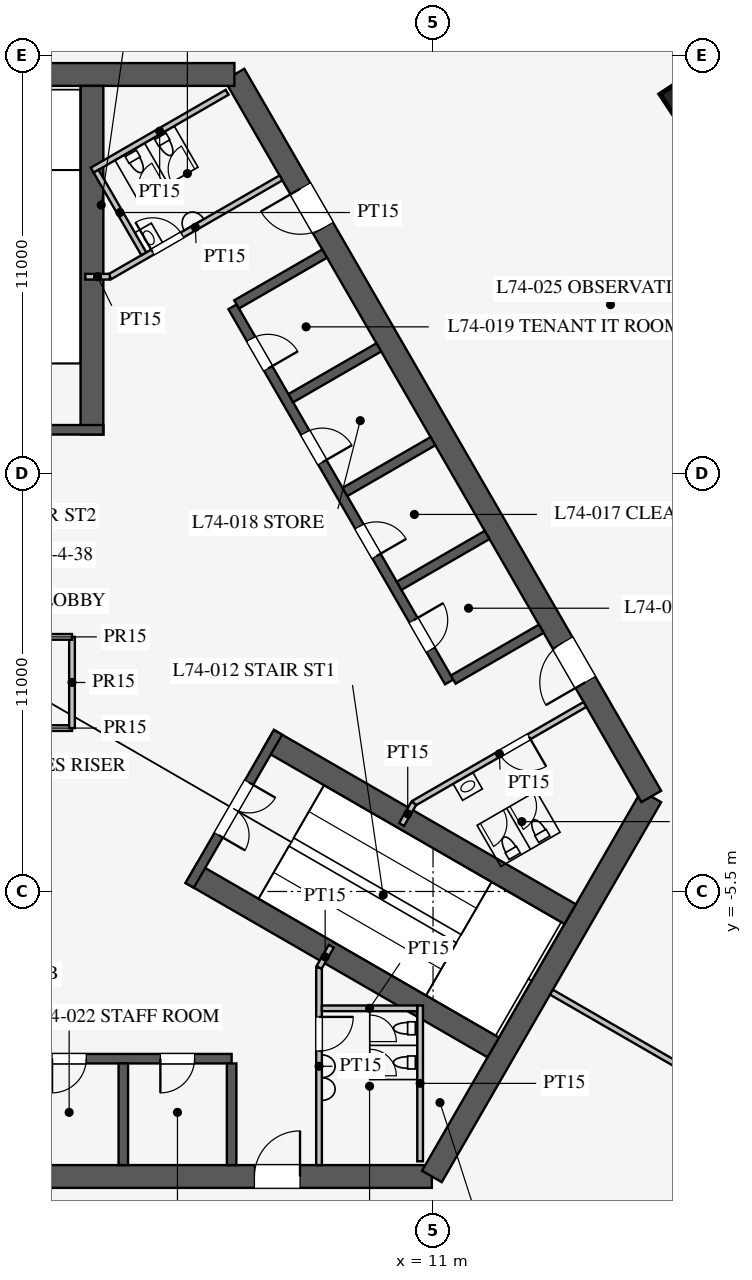
"""IFC4 building model, lengths in metres.
Left out: names, types, materials, properties, quantities, classifications, styles, units other than length and angle.
Written with IfcOpenShell. Run it as: python <this file> out.ifc"""

import sys

from ifc_helpers import new_model, si_unit, direction, frame, frame_2d, origin, origin_2d, place, context, subcontext, project, spatial, rectangle, extrude, element, fill, save


model = new_model("IFC4")
c1 = context("Model", 3, precision=1e-05, world=origin(), true_north=direction((0.0, 1.0)))
c2 = subcontext(c1, "Body", "Model", "MODEL_VIEW")
j1 = project(units=[si_unit("LENGTHUNIT", "METRE"), si_unit("PLANEANGLEUNIT", "RADIAN")], contexts=[c1])
p1 = place(None, origin())
s1 = spatial("IfcSite", under=j1, at=p1, CompositionType="ELEMENT")
p2 = place(p1, origin())
s2 = spatial("IfcBuilding", under=s1, at=p2, CompositionType="ELEMENT")
p3 = place(p2, frame((0.0, 0.0, 322.5)))
s3 = spatial("IfcBuildingStorey", under=s2, at=p3, CompositionType="ELEMENT", Elevation=322.5)
p4 = place(p3, frame((17.594, 15.354, 0.0), z_axis=(0.0, 0.0, 1.0), x_axis=(-0.551523797289, 0.834159158089, 0.0)))
e1 = element("IfcColumn", 1, at=p4, inside=s3, PredefinedType="COLUMN", context=c2, shape_type="SweptSolid", body=[
    extrude(rectangle(XDim=0.9, YDim=0.9, at=origin_2d()), origin(), (0.0, 0.0, 1.0), 6.0),
])
p5 = place(p3, frame((-10.97, -13.0, 0.0), z_axis=(0.0, 0.0, 1.0), x_axis=(1.0, 0.0, 0.0)))
e2 = element("IfcWall", 2, at=p5, inside=s3, PredefinedType="SHEAR", context=c2, shape_type="SweptSolid", body=[
    extrude(rectangle(XDim=21.939, YDim=0.6, at=frame_2d((10.97, 0.0))), origin(), (0.0, 0.0, 1.0), 6.0),
])
p6 = place(p5, frame((17.27, 0.0, 0.0)))
e3 = element("IfcOpeningElement", 3, at=p6, cuts=e2, PredefinedType="OPENING", context=c2, shape_type="SweptSolid", body=[
    extrude(rectangle(XDim=1.2, YDim=2.1, at=frame_2d((0.6, 1.05))), frame((0.0, 0.31, 0.0), z_axis=(0.0, -1.0, 0.0), x_axis=(1.0, 0.0, 0.0)), (0.0, 0.0, 1.0), 0.62),
])
p7 = place(p5, frame((3.47, 0.0, 0.0)))
e4 = element("IfcOpeningElement", 4, at=p7, cuts=e2, PredefinedType="OPENING", context=c2, shape_type="SweptSolid", body=[
    extrude(rectangle(XDim=1.2, YDim=2.1, at=frame_2d((0.6, 1.05))), frame((0.0, 0.31, 0.0), z_axis=(0.0, -1.0, 0.0), x_axis=(1.0, 0.0, 0.0)), (0.0, 0.0, 1.0), 0.62),
])
p8 = place(p3, frame((10.97, -13.0, 0.0), z_axis=(0.0, 0.0, 1.0), x_axis=(0.499995765644, 0.866027848477, 0.0)))
e5 = element("IfcWall", 5, at=p8, inside=s3, PredefinedType="SHEAR", context=c2, shape_type="SweptSolid", body=[
    extrude(rectangle(XDim=11.547, YDim=0.6, at=frame_2d((5.773, 0.0))), origin(), (0.0, 0.0, 1.0), 6.0),
])
p9 = place(p3, frame((16.743, -3.0, 0.0), z_axis=(0.0, 0.0, 1.0), x_axis=(-0.500002442456, 0.866023993627, 0.0)))
e6 = element("IfcWall", 6, at=p9, inside=s3, PredefinedType="SHEAR", context=c2, shape_type="SweptSolid", body=[
    extrude(rectangle(XDim=21.939, YDim=0.6, at=frame_2d((10.97, 0.0))), origin(), (0.0, 0.0, 1.0), 6.0),
])
p10 = place(p9, frame((17.27, 0.0, 0.0)))
e7 = element("IfcOpeningElement", 7, at=p10, cuts=e6, PredefinedType="OPENING", context=c2, shape_type="SweptSolid", body=[
    extrude(rectangle(XDim=1.2, YDim=2.1, at=frame_2d((0.6, 1.05))), frame((0.0, 0.31, 0.0), z_axis=(0.0, -1.0, 0.0), x_axis=(1.0, 0.0, 0.0)), (0.0, 0.0, 1.0), 0.62),
])
p11 = place(p9, frame((3.47, 0.0, 0.0)))
e8 = element("IfcOpeningElement", 8, at=p11, cuts=e6, PredefinedType="OPENING", context=c2, shape_type="SweptSolid", body=[
    extrude(rectangle(XDim=1.2, YDim=2.1, at=frame_2d((0.6, 1.05))), frame((0.0, 0.31, 0.0), z_axis=(0.0, -1.0, 0.0), x_axis=(1.0, 0.0, 0.0)), (0.0, 0.0, 1.0), 0.62),
])
p12 = place(p3, frame((5.773, 16.0, 0.0), z_axis=(0.0, 0.0, 1.0), x_axis=(-1.0, 0.0, 0.0)))
e9 = element("IfcWall", 9, at=p12, inside=s3, PredefinedType="SHEAR", context=c2, shape_type="SweptSolid", body=[
    extrude(rectangle(XDim=11.547, YDim=0.6, at=frame_2d((5.773, 0.0))), origin(), (0.0, 0.0, 1.0), 6.0),
])
p13 = place(p3, frame((-5.7, -9.9, 0.0), z_axis=(0.0, 0.0, 1.0), x_axis=(1.0, 0.0, 0.0)))
e10 = element("IfcWall", 10, at=p13, inside=s3, PredefinedType="SHEAR", context=c2, shape_type="SweptSolid", body=[
    extrude(rectangle(XDim=11.4, YDim=0.25, at=frame_2d((5.7, 0.0))), origin(), (0.0, 0.0, 1.0), 6.0),
])
p14 = place(p13, frame((0.975, 0.0, 0.0)))
e11 = element("IfcOpeningElement", 11, at=p14, cuts=e10, PredefinedType="OPENING", context=c2, shape_type="SweptSolid", body=[
    extrude(rectangle(XDim=0.9, YDim=2.1, at=frame_2d((0.45, 1.05))), frame((0.0, 0.135, 0.0), z_axis=(0.0, -1.0, 0.0), x_axis=(1.0, 0.0, 0.0)), (0.0, 0.0, 1.0), 0.27),
])
p15 = place(p13, frame((3.825, 0.0, 0.0)))
e12 = element("IfcOpeningElement", 12, at=p15, cuts=e10, PredefinedType="OPENING", context=c2, shape_type="SweptSolid", body=[
    extrude(rectangle(XDim=0.9, YDim=2.1, at=frame_2d((0.45, 1.05))), frame((0.0, 0.135, 0.0), z_axis=(0.0, -1.0, 0.0), x_axis=(1.0, 0.0, 0.0)), (0.0, 0.0, 1.0), 0.27),
])
p16 = place(p13, frame((6.675, 0.0, 0.0)))
e13 = element("IfcOpeningElement", 13, at=p16, cuts=e10, PredefinedType="OPENING", context=c2, shape_type="SweptSolid", body=[
    extrude(rectangle(XDim=0.9, YDim=2.1, at=frame_2d((0.45, 1.05))), frame((0.0, 0.135, 0.0), z_axis=(0.0, -1.0, 0.0), x_axis=(1.0, 0.0, 0.0)), (0.0, 0.0, 1.0), 0.27),
])
p17 = place(p13, frame((9.525, 0.0, 0.0)))
e14 = element("IfcOpeningElement", 14, at=p17, cuts=e10, PredefinedType="OPENING", context=c2, shape_type="SweptSolid", body=[
    extrude(rectangle(XDim=0.9, YDim=2.1, at=frame_2d((0.45, 1.05))), frame((0.0, 0.135, 0.0), z_axis=(0.0, -1.0, 0.0), x_axis=(1.0, 0.0, 0.0)), (0.0, 0.0, 1.0), 0.27),
])
for number, where, z_axis, x_axis in (
    (15, (2.85, -10.025, 0.0), (0.0, 0.0, 1.0), (0.0, -1.0, 0.0)),
    (16, (5.7, -10.025, 0.0), (0.0, 0.0, 1.0), (0.0, -1.0, 0.0)),
):
    element("IfcWall", number, at=place(p3, frame(where, z_axis=z_axis, x_axis=x_axis)), inside=s3, PredefinedType="SHEAR", context=c2, shape_type="SweptSolid", body=[
        extrude(rectangle(XDim=2.675, YDim=0.25, at=frame_2d((1.337, 0.0))), origin(), (0.0, 0.0, 1.0), 6.0),
    ])
p18 = place(p3, frame((11.424, 0.014, 0.0), z_axis=(0.0, 0.0, 1.0), x_axis=(-0.500001763848, 0.866024385424, 0.0)))
e17 = element("IfcWall", 17, at=p18, inside=s3, PredefinedType="SHEAR", context=c2, shape_type="SweptSolid", body=[
    extrude(rectangle(XDim=11.4, YDim=0.25, at=frame_2d((5.7, 0.0))), origin(), (0.0, 0.0, 1.0), 6.0),
])
p19 = place(p18, frame((0.975, 0.0, 0.0)))
e18 = element("IfcOpeningElement", 18, at=p19, cuts=e17, PredefinedType="OPENING", context=c2, shape_type="SweptSolid", body=[
    extrude(rectangle(XDim=0.9, YDim=2.1, at=frame_2d((0.45, 1.05))), frame((0.0, 0.135, 0.0), z_axis=(0.0, -1.0, 0.0), x_axis=(1.0, 0.0, 0.0)), (0.0, 0.0, 1.0), 0.27),
])
p20 = place(p18, frame((3.825, 0.0, 0.0)))
e19 = element("IfcOpeningElement", 19, at=p20, cuts=e17, PredefinedType="OPENING", context=c2, shape_type="SweptSolid", body=[
    extrude(rectangle(XDim=0.9, YDim=2.1, at=frame_2d((0.45, 1.05))), frame((0.0, 0.135, 0.0), z_axis=(0.0, -1.0, 0.0), x_axis=(1.0, 0.0, 0.0)), (0.0, 0.0, 1.0), 0.27),
])
p21 = place(p18, frame((6.675, 0.0, 0.0)))
e20 = element("IfcOpeningElement", 20, at=p21, cuts=e17, PredefinedType="OPENING", context=c2, shape_type="SweptSolid", body=[
    extrude(rectangle(XDim=0.9, YDim=2.1, at=frame_2d((0.45, 1.05))), frame((0.0, 0.135, 0.0), z_axis=(0.0, -1.0, 0.0), x_axis=(1.0, 0.0, 0.0)), (0.0, 0.0, 1.0), 0.27),
])
p22 = place(p18, frame((9.525, 0.0, 0.0)))
e21 = element("IfcOpeningElement", 21, at=p22, cuts=e17, PredefinedType="OPENING", context=c2, shape_type="SweptSolid", body=[
    extrude(rectangle(XDim=0.9, YDim=2.1, at=frame_2d((0.45, 1.05))), frame((0.0, 0.135, 0.0), z_axis=(0.0, -1.0, 0.0), x_axis=(1.0, 0.0, 0.0)), (0.0, 0.0, 1.0), 0.27),
])
for number, where, z_axis, x_axis in (
    (22, (11.532, 0.076, 0.0), (0.0, 0.0, 1.0), (0.866, 0.5, 0.0)),
    (23, (10.107, 2.544, 0.0), (0.0, 0.0, 1.0), (0.866, 0.5, 0.0)),
    (24, (8.682, 5.012, 0.0), (0.0, 0.0, 1.0), (0.866, 0.5, 0.0)),
    (25, (7.257, 7.481, 0.0), (0.0, 0.0, 1.0), (0.866, 0.5, 0.0)),
    (26, (5.832, 9.949, 0.0), (0.0, 0.0, 1.0), (0.866, 0.5, 0.0)),
):
    element("IfcWall", number, at=place(p3, frame(where, z_axis=z_axis, x_axis=x_axis)), inside=s3, PredefinedType="SHEAR", context=c2, shape_type="SweptSolid", body=[
        extrude(rectangle(XDim=2.675, YDim=0.25, at=frame_2d((1.337, 0.0))), origin(), (0.0, 0.0, 1.0), 6.0),
    ])
p23 = place(p3, frame((4.638, -5.016, 0.0), z_axis=(0.0, 0.0, 1.0), x_axis=(0.866012320003, -0.50002266109, 0.0)))
e27 = element("IfcWall", 27, at=p23, inside=s3, PredefinedType="SHEAR", context=c2, shape_type="SweptSolid", body=[
    extrude(rectangle(XDim=9.175, YDim=0.6, at=frame_2d((4.587, 0.0))), origin(), (0.0, 0.0, 1.0), 6.0),
])
p24 = place(p3, frame((6.663, -1.509, 0.0), z_axis=(0.0, 0.0, 1.0), x_axis=(0.86603049496, -0.499991181721, 0.0)))
e28 = element("IfcWall", 28, at=p24, inside=s3, PredefinedType="SHEAR", context=c2, shape_type="SweptSolid", body=[
    extrude(rectangle(XDim=9.175, YDim=0.6, at=frame_2d((4.587, 0.0))), origin(), (0.0, 0.0, 1.0), 6.0),
])
p25 = place(p3, frame((4.597, -5.339, 0.0), z_axis=(0.0, 0.0, 1.0), x_axis=(0.499984536904, 0.866034331223, 0.0)))
e29 = element("IfcWall", 29, at=p25, inside=s3, PredefinedType="SHEAR", context=c2, shape_type="SweptSolid", body=[
    extrude(rectangle(XDim=4.65, YDim=0.25, at=frame_2d((2.325, 0.0))), origin(), (0.0, 0.0, 1.0), 6.0),
])
p26 = place(p25, frame((1.525, 0.0, 0.0)))
e30 = element("IfcOpeningElement", 30, at=p26, cuts=e29, PredefinedType="OPENING", context=c2, shape_type="SweptSolid", body=[
    extrude(rectangle(XDim=1.6, YDim=2.1, at=frame_2d((0.8, 1.05))), frame((0.0, 0.135, 0.0), z_axis=(0.0, -1.0, 0.0), x_axis=(1.0, 0.0, 0.0)), (0.0, 0.0, 1.0), 0.27),
])
p27 = place(p3, frame((2.025, 6.525, 0.0), z_axis=(0.0, 0.0, 1.0), x_axis=(0.0, 1.0, 0.0)))
e31 = element("IfcWall", 31, at=p27, inside=s3, PredefinedType="SHEAR", context=c2, shape_type="SweptSolid", body=[
    extrude(rectangle(XDim=9.175, YDim=0.6, at=frame_2d((4.587, 0.0))), origin(), (0.0, 0.0, 1.0), 6.0),
])
p28 = place(p3, frame((2.325, 6.65, 0.0), z_axis=(0.0, 0.0, 1.0), x_axis=(-1.0, 0.0, 0.0)))
e32 = element("IfcWall", 32, at=p28, inside=s3, PredefinedType="SHEAR", context=c2, shape_type="SweptSolid", body=[
    extrude(rectangle(XDim=4.65, YDim=0.25, at=frame_2d((2.325, 0.0))), origin(), (0.0, 0.0, 1.0), 6.0),
])
p29 = place(p28, frame((1.525, 0.0, 0.0)))
e33 = element("IfcOpeningElement", 33, at=p29, cuts=e32, PredefinedType="OPENING", context=c2, shape_type="SweptSolid", body=[
    extrude(rectangle(XDim=1.6, YDim=2.1, at=frame_2d((0.8, 1.05))), frame((0.0, 0.135, 0.0), z_axis=(0.0, -1.0, 0.0), x_axis=(1.0, 0.0, 0.0)), (0.0, 0.0, 1.0), 0.27),
])
p30 = place(p3, frame((8.0, -7.5, 0.0), z_axis=(0.0, 0.0, 1.0), x_axis=(0.0, -1.0, 0.0)))
e34 = element("IfcWall", 34, at=p30, inside=s3, PredefinedType="PARTITIONING", context=c2, shape_type="SweptSolid", body=[
    extrude(rectangle(XDim=5.2, YDim=0.15, at=frame_2d((2.6, 0.0))), origin(), (0.0, 0.0, 1.0), 5.75),
])
p31 = place(p30, frame((1.3, 0.0, 0.0)))
e35 = element("IfcOpeningElement", 35, at=p31, cuts=e34, PredefinedType="OPENING", context=c2, shape_type="SweptSolid", body=[
    extrude(rectangle(XDim=0.9, YDim=2.1, at=frame_2d((0.45, 1.05))), frame((0.0, 0.085, 0.0), z_axis=(0.0, -1.0, 0.0), x_axis=(1.0, 0.0, 0.0)), (0.0, 0.0, 1.0), 0.17),
])
p32 = place(p3, frame((2.495, 10.678, 0.0), z_axis=(0.0, 0.0, 1.0), x_axis=(0.866021400173, 0.500006934395, 0.0)))
e36 = element("IfcWall", 36, at=p32, inside=s3, PredefinedType="PARTITIONING", context=c2, shape_type="SweptSolid", body=[
    extrude(rectangle(XDim=5.2, YDim=0.15, at=frame_2d((2.6, 0.0))), origin(), (0.0, 0.0, 1.0), 5.75),
])
p33 = place(p32, frame((1.3, 0.0, 0.0)))
e37 = element("IfcOpeningElement", 37, at=p33, cuts=e36, PredefinedType="OPENING", context=c2, shape_type="SweptSolid", body=[
    extrude(rectangle(XDim=0.9, YDim=2.1, at=frame_2d((0.45, 1.05))), frame((0.0, 0.085, 0.0), z_axis=(0.0, -1.0, 0.0), x_axis=(1.0, 0.0, 0.0)), (0.0, 0.0, 1.0), 0.17),
])
p34 = place(p3, frame((10.495, -3.178, 0.0), z_axis=(0.0, 0.0, 1.0), x_axis=(0.866021400173, 0.500006934395, 0.0)))
e38 = element("IfcWall", 38, at=p34, inside=s3, PredefinedType="PARTITIONING", context=c2, shape_type="SweptSolid", body=[
    extrude(rectangle(XDim=5.2, YDim=0.15, at=frame_2d((2.6, 0.0))), origin(), (0.0, 0.0, 1.0), 5.75),
])
p35 = place(p34, frame((2.6, 0.0, 0.0)))
e39 = element("IfcOpeningElement", 39, at=p35, cuts=e38, PredefinedType="OPENING", context=c2, shape_type="SweptSolid", body=[
    extrude(rectangle(XDim=0.9, YDim=2.1, at=frame_2d((0.45, 1.05))), frame((0.0, 0.085, 0.0), z_axis=(0.0, -1.0, 0.0), x_axis=(1.0, 0.0, 0.0)), (0.0, 0.0, 1.0), 0.17),
])
for number, where, z_axis, x_axis in (
    (40, (8.0, -7.5, 0.0), (0.0, 0.0, 1.0), (0.5, 0.866, 0.0)),
    (41, (10.495, -3.178, 0.0), (0.0, 0.0, 1.0), (-0.5, -0.866, 0.0)),
):
    element("IfcWall", number, at=place(p3, frame(where, z_axis=z_axis, x_axis=x_axis)), inside=s3, PredefinedType="PARTITIONING", context=c2, shape_type="SweptSolid", body=[
        extrude(rectangle(XDim=0.645, YDim=0.15, at=frame_2d((0.323, 0.0))), origin(), (0.0, 0.0, 1.0), 5.75),
    ])
p36 = place(p3, frame((2.495, 10.678, 0.0), z_axis=(0.0, 0.0, 1.0), x_axis=(-1.0, 0.0, 0.0)))
e42 = element("IfcWall", 42, at=p36, inside=s3, PredefinedType="PARTITIONING", context=c2, shape_type="SweptSolid", body=[
    extrude(rectangle(XDim=0.645, YDim=0.15, at=frame_2d((0.323, 0.0))), origin(), (0.0, 0.0, 1.0), 5.75),
])
p37 = place(p3, frame((10.66, -8.5, 0.0), z_axis=(0.0, 0.0, 1.0), x_axis=(0.0, -1.0, 0.0)))
e43 = element("IfcWall", 43, at=p37, inside=s3, PredefinedType="PARTITIONING", context=c2, shape_type="SweptSolid", body=[
    extrude(rectangle(XDim=4.1, YDim=0.15, at=frame_2d((2.05, 0.0))), origin(), (0.0, 0.0, 1.0), 5.75),
])
p38 = place(p3, frame((8.075, -8.575, 0.0), z_axis=(0.0, 0.0, 1.0), x_axis=(1.0, 0.0, 0.0)))
e44 = element("IfcWall", 44, at=p38, inside=s3, PredefinedType="PARTITIONING", context=c2, shape_type="SweptSolid", body=[
    extrude(rectangle(XDim=2.51, YDim=0.15, at=frame_2d((1.255, 0.0))), origin(), (0.0, 0.0, 1.0), 5.75),
])
p39 = place(p3, frame((2.031, 13.482, 0.0), z_axis=(0.0, 0.0, 1.0), x_axis=(0.866050731258, 0.499956128963, 0.0)))
e45 = element("IfcWall", 45, at=p39, inside=s3, PredefinedType="PARTITIONING", context=c2, shape_type="SweptSolid", body=[
    extrude(rectangle(XDim=4.1, YDim=0.15, at=frame_2d((2.05, 0.0))), origin(), (0.0, 0.0, 1.0), 5.75),
])
p40 = place(p3, frame((3.389, 11.281, 0.0), z_axis=(0.0, 0.0, 1.0), x_axis=(-0.499989096993, 0.866031698547, 0.0)))
e46 = element("IfcWall", 46, at=p40, inside=s3, PredefinedType="PARTITIONING", context=c2, shape_type="SweptSolid", body=[
    extrude(rectangle(XDim=2.51, YDim=0.15, at=frame_2d((1.255, 0.0))), origin(), (0.0, 0.0, 1.0), 5.75),
])
p41 = place(p3, frame((-1.5, -1.2, 0.0), z_axis=(0.0, 0.0, 1.0), x_axis=(1.0, 0.0, 0.0)))
e47 = element("IfcWall", 47, at=p41, inside=s3, PredefinedType="PARTITIONING", context=c2, shape_type="SweptSolid", body=[
    extrude(rectangle(XDim=3.0, YDim=0.15, at=frame_2d((1.5, 0.0))), origin(), (0.0, 0.0, 1.0), 5.75),
])
p42 = place(p41, frame((1.05, 0.0, 0.0)))
e48 = element("IfcOpeningElement", 48, at=p42, cuts=e47, PredefinedType="OPENING", context=c2, shape_type="SweptSolid", body=[
    extrude(rectangle(XDim=0.9, YDim=2.1, at=frame_2d((0.45, 1.05))), frame((0.0, 0.085, 0.0), z_axis=(0.0, -1.0, 0.0), x_axis=(1.0, 0.0, 0.0)), (0.0, 0.0, 1.0), 0.17),
])
p43 = place(p3, frame((1.5, -1.2, 0.0), z_axis=(0.0, 0.0, 1.0), x_axis=(0.0, 1.0, 0.0)))
e49 = element("IfcWall", 49, at=p43, inside=s3, PredefinedType="PARTITIONING", context=c2, shape_type="SweptSolid", body=[
    extrude(rectangle(XDim=2.4, YDim=0.15, at=frame_2d((1.2, 0.0))), origin(), (0.0, 0.0, 1.0), 5.75),
])
p44 = place(p3, frame((1.5, 1.2, 0.0), z_axis=(0.0, 0.0, 1.0), x_axis=(-1.0, 0.0, 0.0)))
e50 = element("IfcWall", 50, at=p44, inside=s3, PredefinedType="PARTITIONING", context=c2, shape_type="SweptSolid", body=[
    extrude(rectangle(XDim=3.0, YDim=0.15, at=frame_2d((1.5, 0.0))), origin(), (0.0, 0.0, 1.0), 5.75),
])
p45 = place(p3, frame((14.116, -8.15, 0.0), z_axis=(0.0, 0.0, 1.0), x_axis=(0.866020541135, -0.500008422262, 0.0)))
e51 = element("IfcWall", 51, at=p45, inside=s3, PredefinedType="PARTITIONING", context=c2, shape_type="SweptSolid", body=[
    extrude(rectangle(XDim=13.45, YDim=0.15, at=frame_2d((6.725, 0.0))), origin(), (0.0, 0.0, 1.0), 3.75),
])
p46 = place(p31, origin())
e52 = element("IfcDoor", 52, at=p46, inside=s3, OperationType="SINGLE_SWING_LEFT", PredefinedType="DOOR", context=c2, shape_type="SweptSolid", body=[
    extrude(rectangle(XDim=0.9, YDim=2.1, at=frame_2d((0.45, 1.05))), frame((0.0, 0.025, 0.0), z_axis=(0.0, -1.0, 0.0), x_axis=(1.0, 0.0, 0.0)), (0.0, 0.0, 1.0), 0.05),
])
fill(e35, e52)
p47 = place(p33, origin())
e53 = element("IfcDoor", 53, at=p47, inside=s3, OperationType="SINGLE_SWING_LEFT", PredefinedType="DOOR", context=c2, shape_type="SweptSolid", body=[
    extrude(rectangle(XDim=0.9, YDim=2.1, at=frame_2d((0.45, 1.05))), frame((0.0, 0.025, 0.0), z_axis=(0.0, -1.0, 0.0), x_axis=(1.0, 0.0, 0.0)), (0.0, 0.0, 1.0), 0.05),
])
fill(e37, e53)
p48 = place(p35, frame((0.9, 0.0, 0.0), z_axis=(0.0, 0.0, 1.0), x_axis=(-1.0, 0.0, 0.0)))
e54 = element("IfcDoor", 54, at=p48, inside=s3, OperationType="SINGLE_SWING_LEFT", PredefinedType="DOOR", context=c2, shape_type="SweptSolid", body=[
    extrude(rectangle(XDim=0.9, YDim=2.1, at=frame_2d((0.45, 1.05))), frame((0.0, 0.025, 0.0), z_axis=(0.0, -1.0, 0.0), x_axis=(1.0, 0.0, 0.0)), (0.0, 0.0, 1.0), 0.05),
])
fill(e39, e54)
p49 = place(p26, frame((1.6, 0.0, 0.0), z_axis=(0.0, 0.0, 1.0), x_axis=(-1.0, 0.0, 0.0)))
e55 = element("IfcDoor", 55, at=p49, inside=s3, OperationType="DOUBLE_DOOR_SINGLE_SWING", PredefinedType="DOOR", context=c2, shape_type="SweptSolid", body=[
    extrude(rectangle(XDim=1.6, YDim=2.1, at=frame_2d((0.8, 1.05))), frame((0.0, 0.025, 0.0), z_axis=(0.0, -1.0, 0.0), x_axis=(1.0, 0.0, 0.0)), (0.0, 0.0, 1.0), 0.05),
])
fill(e30, e55)
p50 = place(p6, origin())
e56 = element("IfcDoor", 56, at=p50, inside=s3, OperationType="SINGLE_SWING_RIGHT", PredefinedType="DOOR", context=c2, shape_type="SweptSolid", body=[
    extrude(rectangle(XDim=1.2, YDim=2.1, at=frame_2d((0.6, 1.05))), frame((0.0, 0.025, 0.0), z_axis=(0.0, -1.0, 0.0), x_axis=(1.0, 0.0, 0.0)), (0.0, 0.0, 1.0), 0.05),
])
fill(e3, e56)
p51 = place(p10, origin())
e57 = element("IfcDoor", 57, at=p51, inside=s3, OperationType="SINGLE_SWING_RIGHT", PredefinedType="DOOR", context=c2, shape_type="SweptSolid", body=[
    extrude(rectangle(XDim=1.2, YDim=2.1, at=frame_2d((0.6, 1.05))), frame((0.0, 0.025, 0.0), z_axis=(0.0, -1.0, 0.0), x_axis=(1.0, 0.0, 0.0)), (0.0, 0.0, 1.0), 0.05),
])
fill(e7, e57)
p52 = place(p11, origin())
e58 = element("IfcDoor", 58, at=p52, inside=s3, OperationType="SINGLE_SWING_LEFT", PredefinedType="DOOR", context=c2, shape_type="SweptSolid", body=[
    extrude(rectangle(XDim=1.2, YDim=2.1, at=frame_2d((0.6, 1.05))), frame((0.0, 0.025, 0.0), z_axis=(0.0, -1.0, 0.0), x_axis=(1.0, 0.0, 0.0)), (0.0, 0.0, 1.0), 0.05),
])
fill(e8, e58)
p53 = place(p19, frame((0.9, 0.0, 0.0), z_axis=(0.0, 0.0, 1.0), x_axis=(-1.0, 0.0, 0.0)))
e59 = element("IfcDoor", 59, at=p53, inside=s3, OperationType="SINGLE_SWING_LEFT", PredefinedType="DOOR", context=c2, shape_type="SweptSolid", body=[
    extrude(rectangle(XDim=0.9, YDim=2.1, at=frame_2d((0.45, 1.05))), frame((0.0, 0.025, 0.0), z_axis=(0.0, -1.0, 0.0), x_axis=(1.0, 0.0, 0.0)), (0.0, 0.0, 1.0), 0.05),
])
fill(e18, e59)
p54 = place(p20, frame((0.9, 0.0, 0.0), z_axis=(0.0, 0.0, 1.0), x_axis=(-1.0, 0.0, 0.0)))
e60 = element("IfcDoor", 60, at=p54, inside=s3, OperationType="SINGLE_SWING_RIGHT", PredefinedType="DOOR", context=c2, shape_type="SweptSolid", body=[
    extrude(rectangle(XDim=0.9, YDim=2.1, at=frame_2d((0.45, 1.05))), frame((0.0, 0.025, 0.0), z_axis=(0.0, -1.0, 0.0), x_axis=(1.0, 0.0, 0.0)), (0.0, 0.0, 1.0), 0.05),
])
fill(e19, e60)
p55 = place(p21, frame((0.9, 0.0, 0.0), z_axis=(0.0, 0.0, 1.0), x_axis=(-1.0, 0.0, 0.0)))
e61 = element("IfcDoor", 61, at=p55, inside=s3, OperationType="SINGLE_SWING_RIGHT", PredefinedType="DOOR", context=c2, shape_type="SweptSolid", body=[
    extrude(rectangle(XDim=0.9, YDim=2.1, at=frame_2d((0.45, 1.05))), frame((0.0, 0.025, 0.0), z_axis=(0.0, -1.0, 0.0), x_axis=(1.0, 0.0, 0.0)), (0.0, 0.0, 1.0), 0.05),
])
fill(e20, e61)
p56 = place(p22, frame((0.9, 0.0, 0.0), z_axis=(0.0, 0.0, 1.0), x_axis=(-1.0, 0.0, 0.0)))
e62 = element("IfcDoor", 62, at=p56, inside=s3, OperationType="SINGLE_SWING_RIGHT", PredefinedType="DOOR", context=c2, shape_type="SweptSolid", body=[
    extrude(rectangle(XDim=0.9, YDim=2.1, at=frame_2d((0.45, 1.05))), frame((0.0, 0.025, 0.0), z_axis=(0.0, -1.0, 0.0), x_axis=(1.0, 0.0, 0.0)), (0.0, 0.0, 1.0), 0.05),
])
fill(e21, e62)
p57 = place(p16, frame((0.9, 0.0, 0.0), z_axis=(0.0, 0.0, 1.0), x_axis=(-1.0, 0.0, 0.0)))
e63 = element("IfcDoor", 63, at=p57, inside=s3, OperationType="SINGLE_SWING_RIGHT", PredefinedType="DOOR", context=c2, shape_type="SweptSolid", body=[
    extrude(rectangle(XDim=0.9, YDim=2.1, at=frame_2d((0.45, 1.05))), frame((0.0, 0.025, 0.0), z_axis=(0.0, -1.0, 0.0), x_axis=(1.0, 0.0, 0.0)), (0.0, 0.0, 1.0), 0.05),
])
fill(e13, e63)
p58 = place(p17, frame((0.9, 0.0, 0.0), z_axis=(0.0, 0.0, 1.0), x_axis=(-1.0, 0.0, 0.0)))
e64 = element("IfcDoor", 64, at=p58, inside=s3, OperationType="SINGLE_SWING_RIGHT", PredefinedType="DOOR", context=c2, shape_type="SweptSolid", body=[
    extrude(rectangle(XDim=0.9, YDim=2.1, at=frame_2d((0.45, 1.05))), frame((0.0, 0.025, 0.0), z_axis=(0.0, -1.0, 0.0), x_axis=(1.0, 0.0, 0.0)), (0.0, 0.0, 1.0), 0.05),
])
fill(e14, e64)
save(model, sys.argv[1])
